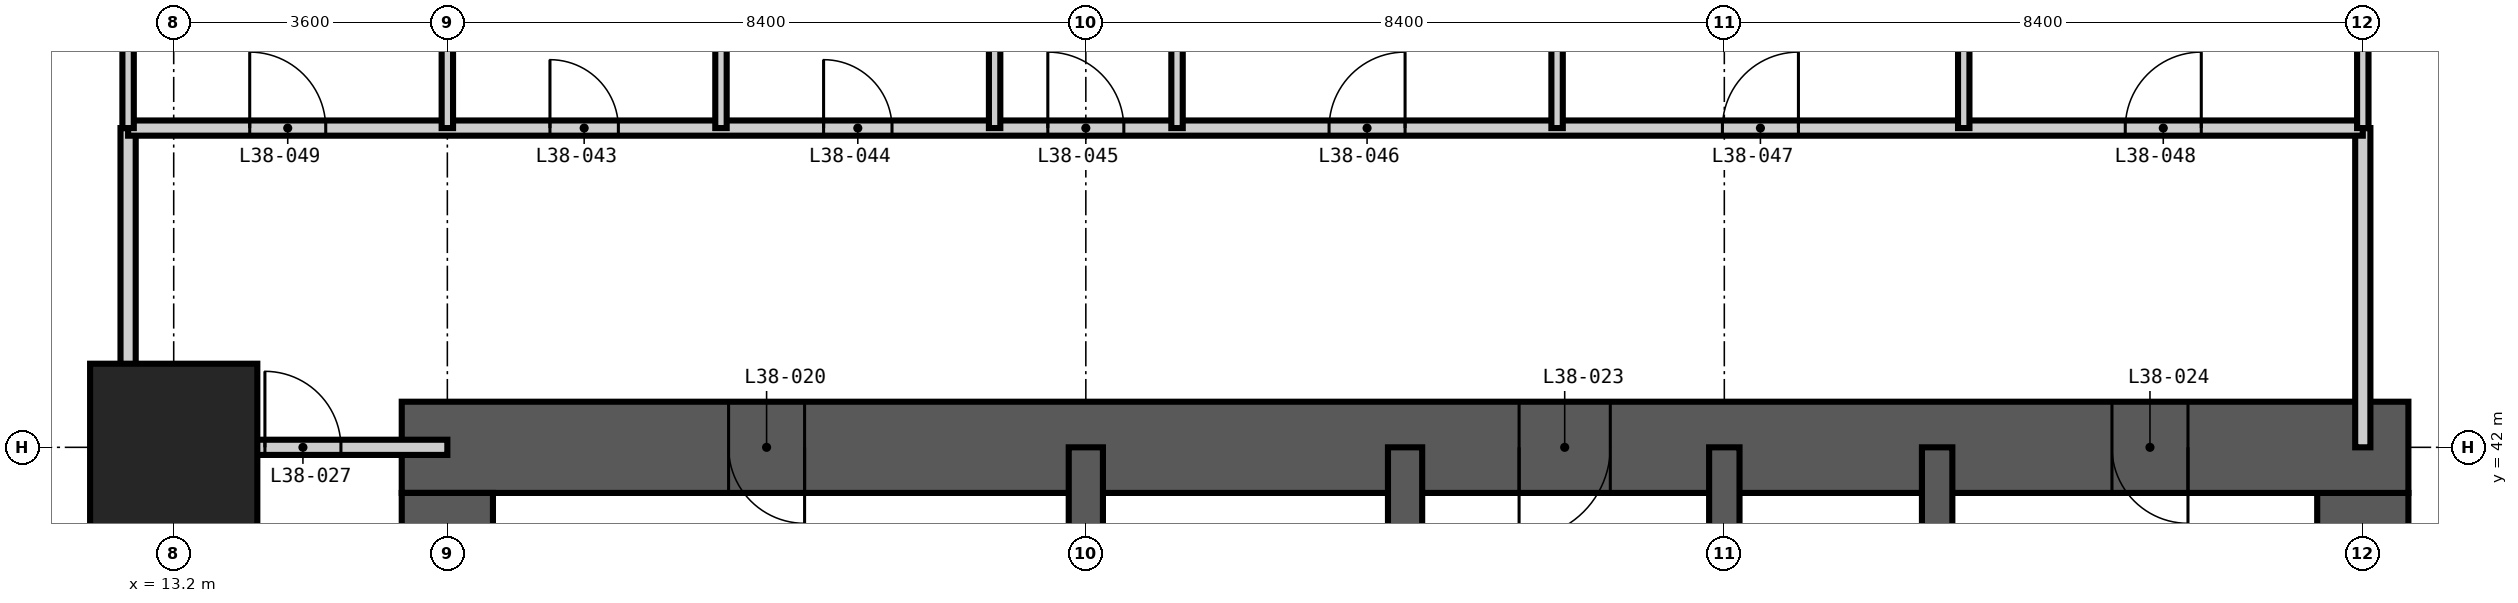
"""IFC4 building model, lengths in metres.
Left out: names, types, materials, properties, quantities, classifications, styles, units other than length and angle.
Written with IfcOpenShell. Run it as: python <this file> out.ifc"""

import sys

from ifc_helpers import new_model, si_unit, direction, frame, frame_2d, origin, origin_2d, place, context, subcontext, project, spatial, rectangle, extrude, element, fill, save


model = new_model("IFC4")
c1 = context("Model", 3, precision=1e-05, world=origin(), true_north=direction((0.0, 1.0)))
c2 = subcontext(c1, "Body", "Model", "MODEL_VIEW")
j1 = project(units=[si_unit("LENGTHUNIT", "METRE"), si_unit("PLANEANGLEUNIT", "RADIAN")], contexts=[c1])
p1 = place(None, origin())
s1 = spatial("IfcSite", under=j1, at=p1, CompositionType="ELEMENT")
p2 = place(p1, origin())
s2 = spatial("IfcBuilding", under=s1, at=p2, CompositionType="ELEMENT")
p3 = place(p2, frame((0.0, 0.0, 147.6)))
s3 = spatial("IfcBuildingStorey", under=s2, at=p3, CompositionType="ELEMENT", Elevation=147.6)
p4 = place(p3, frame((13.2, 42.0, -0.35), z_axis=(0.0, 0.0, 1.0), x_axis=(1.0, 0.0, 0.0)))
e1 = element("IfcColumn", 1, at=p4, inside=s3, PredefinedType="COLUMN", context=c2, shape_type="SweptSolid", body=[
    extrude(rectangle(XDim=2.2, YDim=2.2, at=origin_2d()), origin(), (0.0, 0.0, 1.0), 5.95),
])
p5 = place(p3, frame((42.0, 17.4, -0.35), z_axis=(0.0, 0.0, 1.0), x_axis=(0.0, 1.0, 0.0)))
e2 = element("IfcWall", 2, at=p5, inside=s3, PredefinedType="SHEAR", context=c2, shape_type="SweptSolid", body=[
    extrude(rectangle(XDim=24.0, YDim=1.2, at=frame_2d((12.0, 0.0))), origin(), (0.0, 0.0, 1.0), 5.95),
])
p6 = place(p5, frame((0.2, 0.0, 0.35)))
e3 = element("IfcOpeningElement", 3, at=p6, cuts=e2, PredefinedType="OPENING", context=c2, shape_type="SweptSolid", body=[
    extrude(rectangle(XDim=1.2, YDim=2.2, at=frame_2d((0.6, 1.1))), frame((0.0, 0.61, 0.0), z_axis=(0.0, -1.0, 0.0), x_axis=(1.0, 0.0, 0.0)), (0.0, 0.0, 1.0), 1.22),
])
p7 = place(p5, frame((11.1, 0.0, 0.35)))
e4 = element("IfcOpeningElement", 4, at=p7, cuts=e2, PredefinedType="OPENING", context=c2, shape_type="SweptSolid", body=[
    extrude(rectangle(XDim=1.8, YDim=2.2, at=frame_2d((0.9, 1.1))), frame((0.0, 0.61, 0.0), z_axis=(0.0, -1.0, 0.0), x_axis=(1.0, 0.0, 0.0)), (0.0, 0.0, 1.0), 1.22),
])
p8 = place(p3, frame((42.6, 42.0, -0.35), z_axis=(0.0, 0.0, 1.0), x_axis=(-1.0, 0.0, 0.0)))
e5 = element("IfcWall", 5, at=p8, inside=s3, PredefinedType="SHEAR", context=c2, shape_type="SweptSolid", body=[
    extrude(rectangle(XDim=26.4, YDim=1.2, at=frame_2d((13.2, 0.0))), origin(), (0.0, 0.0, 1.0), 5.95),
])
p9 = place(p8, frame((21.1, 0.0, 0.35)))
e6 = element("IfcOpeningElement", 6, at=p9, cuts=e5, PredefinedType="OPENING", context=c2, shape_type="SweptSolid", body=[
    extrude(rectangle(XDim=1.0, YDim=2.1, at=frame_2d((0.5, 1.05))), frame((0.0, 0.61, 0.0), z_axis=(0.0, -1.0, 0.0), x_axis=(1.0, 0.0, 0.0)), (0.0, 0.0, 1.0), 1.22),
])
p10 = place(p8, frame((10.5, 0.0, 0.35)))
e7 = element("IfcOpeningElement", 7, at=p10, cuts=e5, PredefinedType="OPENING", context=c2, shape_type="SweptSolid", body=[
    extrude(rectangle(XDim=1.2, YDim=2.2, at=frame_2d((0.6, 1.1))), frame((0.0, 0.61, 0.0), z_axis=(0.0, -1.0, 0.0), x_axis=(1.0, 0.0, 0.0)), (0.0, 0.0, 1.0), 1.22),
])
p11 = place(p8, frame((2.9, 0.0, 0.35)))
e8 = element("IfcOpeningElement", 8, at=p11, cuts=e5, PredefinedType="OPENING", context=c2, shape_type="SweptSolid", body=[
    extrude(rectangle(XDim=1.0, YDim=2.1, at=frame_2d((0.5, 1.05))), frame((0.0, 0.61, 0.0), z_axis=(0.0, -1.0, 0.0), x_axis=(1.0, 0.0, 0.0)), (0.0, 0.0, 1.0), 1.22),
])
p12 = place(p3, frame((16.8, 41.4, -0.35), z_axis=(0.0, 0.0, 1.0), x_axis=(0.0, -1.0, 0.0)))
e9 = element("IfcWall", 9, at=p12, inside=s3, PredefinedType="SHEAR", context=c2, shape_type="SweptSolid", body=[
    extrude(rectangle(XDim=24.0, YDim=1.2, at=frame_2d((12.0, 0.0))), origin(), (0.0, 0.0, 1.0), 5.95),
])
p13 = place(p12, frame((11.1, 0.0, 0.35)))
e10 = element("IfcOpeningElement", 10, at=p13, cuts=e9, PredefinedType="OPENING", context=c2, shape_type="SweptSolid", body=[
    extrude(rectangle(XDim=1.8, YDim=2.2, at=frame_2d((0.9, 1.1))), frame((0.0, 0.61, 0.0), z_axis=(0.0, -1.0, 0.0), x_axis=(1.0, 0.0, 0.0)), (0.0, 0.0, 1.0), 1.22),
])
p14 = place(p12, frame((19.5, 0.0, 0.35)))
e11 = element("IfcOpeningElement", 11, at=p14, cuts=e9, PredefinedType="OPENING", context=c2, shape_type="SweptSolid", body=[
    extrude(rectangle(XDim=1.8, YDim=2.2, at=frame_2d((0.9, 1.1))), frame((0.0, 0.61, 0.0), z_axis=(0.0, -1.0, 0.0), x_axis=(1.0, 0.0, 0.0)), (0.0, 0.0, 1.0), 1.22),
])
p15 = place(p12, frame((5.2, 0.0, 0.35)))
e12 = element("IfcOpeningElement", 12, at=p15, cuts=e9, PredefinedType="OPENING", context=c2, shape_type="SweptSolid", body=[
    extrude(rectangle(XDim=1.0, YDim=2.1, at=frame_2d((0.5, 1.05))), frame((0.0, 0.61, 0.0), z_axis=(0.0, -1.0, 0.0), x_axis=(1.0, 0.0, 0.0)), (0.0, 0.0, 1.0), 1.22),
])
p16 = place(p3, frame((33.6, 16.8, -0.35), z_axis=(0.0, 0.0, 1.0), x_axis=(0.0, 1.0, 0.0)))
e13 = element("IfcWall", 13, at=p16, inside=s3, PredefinedType="SHEAR", context=c2, shape_type="SweptSolid", body=[
    extrude(rectangle(XDim=25.2, YDim=0.4, at=frame_2d((12.6, 0.0))), origin(), (0.0, 0.0, 1.0), 5.95),
])
p17 = place(p16, frame((22.5, 0.0, 0.35)))
e14 = element("IfcOpeningElement", 14, at=p17, cuts=e13, PredefinedType="OPENING", context=c2, shape_type="SweptSolid", body=[
    extrude(rectangle(XDim=1.2, YDim=2.2, at=frame_2d((0.6, 1.1))), frame((0.0, 0.21, 0.0), z_axis=(0.0, -1.0, 0.0), x_axis=(1.0, 0.0, 0.0)), (0.0, 0.0, 1.0), 0.42),
])
p18 = place(p16, frame((18.3, 0.0, 0.35)))
e15 = element("IfcOpeningElement", 15, at=p18, cuts=e13, PredefinedType="OPENING", context=c2, shape_type="SweptSolid", body=[
    extrude(rectangle(XDim=1.2, YDim=2.2, at=frame_2d((0.6, 1.1))), frame((0.0, 0.21, 0.0), z_axis=(0.0, -1.0, 0.0), x_axis=(1.0, 0.0, 0.0)), (0.0, 0.0, 1.0), 0.42),
])
p19 = place(p3, frame((36.4, 33.6, -0.35), z_axis=(0.0, 0.0, 1.0), x_axis=(0.0, 1.0, 0.0)))
e16 = element("IfcWall", 16, at=p19, inside=s3, PredefinedType="SHEAR", context=c2, shape_type="SweptSolid", body=[
    extrude(rectangle(XDim=8.4, YDim=0.4, at=frame_2d((4.2, 0.0))), origin(), (0.0, 0.0, 1.0), 5.95),
])
p20 = place(p3, frame((25.2, 16.8, -0.35), z_axis=(0.0, 0.0, 1.0), x_axis=(0.0, 1.0, 0.0)))
e17 = element("IfcWall", 17, at=p20, inside=s3, PredefinedType="SHEAR", context=c2, shape_type="SweptSolid", body=[
    extrude(rectangle(XDim=25.2, YDim=0.45, at=frame_2d((12.6, 0.0))), origin(), (0.0, 0.0, 1.0), 5.95),
])
p21 = place(p3, frame((29.4, 33.6, -0.35), z_axis=(0.0, 0.0, 1.0), x_axis=(0.0, 1.0, 0.0)))
e18 = element("IfcWall", 18, at=p21, inside=s3, PredefinedType="SHEAR", context=c2, shape_type="SweptSolid", body=[
    extrude(rectangle(XDim=8.4, YDim=0.45, at=frame_2d((4.2, 0.0))), origin(), (0.0, 0.0, 1.0), 5.95),
])
p22 = place(p21, frame((0.525, 0.0, 0.35)))
e19 = element("IfcOpeningElement", 19, at=p22, cuts=e18, PredefinedType="OPENING", context=c2, shape_type="SweptSolid", body=[
    extrude(rectangle(XDim=1.2, YDim=2.2, at=frame_2d((0.6, 1.1))), frame((0.0, 0.235, 0.0), z_axis=(0.0, -1.0, 0.0), x_axis=(1.0, 0.0, 0.0)), (0.0, 0.0, 1.0), 0.47),
])
p23 = place(p3, frame((12.6, 33.6, 0.0), z_axis=(0.0, 0.0, 1.0), x_axis=(0.0, 1.0, 0.0)))
e20 = element("IfcWall", 20, at=p23, inside=s3, PredefinedType="PARTITIONING", context=c2, shape_type="SweptSolid", body=[
    extrude(rectangle(XDim=12.6, YDim=0.2, at=frame_2d((6.3, 0.0))), origin(), (0.0, 0.0, 1.0), 5.6),
])
p24 = place(p3, frame((42.0, 42.0, 0.0), z_axis=(0.0, 0.0, 1.0), x_axis=(0.0, 1.0, 0.0)))
e21 = element("IfcWall", 21, at=p24, inside=s3, PredefinedType="PARTITIONING", context=c2, shape_type="SweptSolid", body=[
    extrude(rectangle(XDim=4.2, YDim=0.2, at=frame_2d((2.1, 0.0))), origin(), (0.0, 0.0, 1.0), 5.6),
])
p25 = place(p3, frame((12.6, 42.0, 0.0), z_axis=(0.0, 0.0, 1.0), x_axis=(1.0, 0.0, 0.0)))
e22 = element("IfcWall", 22, at=p25, inside=s3, PredefinedType="PARTITIONING", context=c2, shape_type="SweptSolid", body=[
    extrude(rectangle(XDim=4.2, YDim=0.2, at=frame_2d((2.1, 0.0))), origin(), (0.0, 0.0, 1.0), 5.6),
])
p26 = place(p25, frame((1.8, 0.0, 0.0)))
e23 = element("IfcOpeningElement", 23, at=p26, cuts=e22, PredefinedType="OPENING", context=c2, shape_type="SweptSolid", body=[
    extrude(rectangle(XDim=1.0, YDim=2.1, at=frame_2d((0.5, 1.05))), frame((0.0, 0.11, 0.0), z_axis=(0.0, -1.0, 0.0), x_axis=(1.0, 0.0, 0.0)), (0.0, 0.0, 1.0), 0.22),
])
p27 = place(p3, frame((12.6, 46.2, 0.0), z_axis=(0.0, 0.0, 1.0), x_axis=(1.0, 0.0, 0.0)))
e24 = element("IfcWall", 24, at=p27, inside=s3, PredefinedType="PARTITIONING", context=c2, shape_type="SweptSolid", body=[
    extrude(rectangle(XDim=29.4, YDim=0.2, at=frame_2d((14.7, 0.0))), origin(), (0.0, 0.0, 1.0), 5.6),
])
p28 = place(p27, frame((5.55, 0.0, 0.0)))
e25 = element("IfcOpeningElement", 25, at=p28, cuts=e24, PredefinedType="OPENING", context=c2, shape_type="SweptSolid", body=[
    extrude(rectangle(XDim=0.9, YDim=2.1, at=frame_2d((0.45, 1.05))), frame((0.0, 0.11, 0.0), z_axis=(0.0, -1.0, 0.0), x_axis=(1.0, 0.0, 0.0)), (0.0, 0.0, 1.0), 0.22),
])
p29 = place(p27, frame((9.15, 0.0, 0.0)))
e26 = element("IfcOpeningElement", 26, at=p29, cuts=e24, PredefinedType="OPENING", context=c2, shape_type="SweptSolid", body=[
    extrude(rectangle(XDim=0.9, YDim=2.1, at=frame_2d((0.45, 1.05))), frame((0.0, 0.11, 0.0), z_axis=(0.0, -1.0, 0.0), x_axis=(1.0, 0.0, 0.0)), (0.0, 0.0, 1.0), 0.22),
])
p30 = place(p27, frame((12.1, 0.0, 0.0)))
e27 = element("IfcOpeningElement", 27, at=p30, cuts=e24, PredefinedType="OPENING", context=c2, shape_type="SweptSolid", body=[
    extrude(rectangle(XDim=1.0, YDim=2.1, at=frame_2d((0.5, 1.05))), frame((0.0, 0.11, 0.0), z_axis=(0.0, -1.0, 0.0), x_axis=(1.0, 0.0, 0.0)), (0.0, 0.0, 1.0), 0.22),
])
p31 = place(p27, frame((15.8, 0.0, 0.0)))
e28 = element("IfcOpeningElement", 28, at=p31, cuts=e24, PredefinedType="OPENING", context=c2, shape_type="SweptSolid", body=[
    extrude(rectangle(XDim=1.0, YDim=2.1, at=frame_2d((0.5, 1.05))), frame((0.0, 0.11, 0.0), z_axis=(0.0, -1.0, 0.0), x_axis=(1.0, 0.0, 0.0)), (0.0, 0.0, 1.0), 0.22),
])
p32 = place(p27, frame((20.975, 0.0, 0.0)))
e29 = element("IfcOpeningElement", 29, at=p32, cuts=e24, PredefinedType="OPENING", context=c2, shape_type="SweptSolid", body=[
    extrude(rectangle(XDim=1.0, YDim=2.1, at=frame_2d((0.5, 1.05))), frame((0.0, 0.11, 0.0), z_axis=(0.0, -1.0, 0.0), x_axis=(1.0, 0.0, 0.0)), (0.0, 0.0, 1.0), 0.22),
])
p33 = place(p27, frame((26.275, 0.0, 0.0)))
e30 = element("IfcOpeningElement", 30, at=p33, cuts=e24, PredefinedType="OPENING", context=c2, shape_type="SweptSolid", body=[
    extrude(rectangle(XDim=1.0, YDim=2.1, at=frame_2d((0.5, 1.05))), frame((0.0, 0.11, 0.0), z_axis=(0.0, -1.0, 0.0), x_axis=(1.0, 0.0, 0.0)), (0.0, 0.0, 1.0), 0.22),
])
p34 = place(p27, frame((1.6, 0.0, 0.0)))
e31 = element("IfcOpeningElement", 31, at=p34, cuts=e24, PredefinedType="OPENING", context=c2, shape_type="SweptSolid", body=[
    extrude(rectangle(XDim=1.0, YDim=2.1, at=frame_2d((0.5, 1.05))), frame((0.0, 0.11, 0.0), z_axis=(0.0, -1.0, 0.0), x_axis=(1.0, 0.0, 0.0)), (0.0, 0.0, 1.0), 0.22),
])
p35 = place(p3, frame((12.6, 46.2, 0.0), z_axis=(0.0, 0.0, 1.0), x_axis=(0.0, 1.0, 0.0)))
e32 = element("IfcWall", 32, at=p35, inside=s3, PredefinedType="PARTITIONING", context=c2, shape_type="SweptSolid", body=[
    extrude(rectangle(XDim=8.438, YDim=0.15, at=frame_2d((4.219, 0.0))), origin(), (0.0, 0.0, 1.0), 5.6),
])
for number, where, z_axis, x_axis in (
    (33, (16.8, 46.2, 0.0), (0.0, 0.0, 1.0), (0.0, 1.0, 0.0)),
    (34, (20.4, 46.2, 0.0), (0.0, 0.0, 1.0), (0.0, 1.0, 0.0)),
    (35, (24.0, 46.2, 0.0), (0.0, 0.0, 1.0), (0.0, 1.0, 0.0)),
):
    element("IfcWall", number, at=place(p3, frame(where, z_axis=z_axis, x_axis=x_axis)), inside=s3, PredefinedType="PARTITIONING", context=c2, shape_type="SweptSolid", body=[
        extrude(rectangle(XDim=4.2, YDim=0.15, at=frame_2d((2.1, 0.0))), origin(), (0.0, 0.0, 1.0), 5.6),
    ])
p36 = place(p3, frame((26.4, 46.2, 0.0), z_axis=(0.0, 0.0, 1.0), x_axis=(0.0, 1.0, 0.0)))
e36 = element("IfcWall", 36, at=p36, inside=s3, PredefinedType="PARTITIONING", context=c2, shape_type="SweptSolid", body=[
    extrude(rectangle(XDim=8.438, YDim=0.15, at=frame_2d((4.219, 0.0))), origin(), (0.0, 0.0, 1.0), 5.6),
])
p37 = place(p3, frame((31.4, 46.2, 0.0), z_axis=(0.0, 0.0, 1.0), x_axis=(0.0, 1.0, 0.0)))
e37 = element("IfcWall", 37, at=p37, inside=s3, PredefinedType="PARTITIONING", context=c2, shape_type="SweptSolid", body=[
    extrude(rectangle(XDim=8.4, YDim=0.15, at=frame_2d((4.2, 0.0))), origin(), (0.0, 0.0, 1.0), 5.6),
])
for number, where, z_axis, x_axis in (
    (38, (36.75, 46.2, 0.0), (0.0, 0.0, 1.0), (0.0, 1.0, 0.0)),
    (39, (42.0, 46.2, 0.0), (0.0, 0.0, 1.0), (0.0, 1.0, 0.0)),
):
    element("IfcWall", number, at=place(p3, frame(where, z_axis=z_axis, x_axis=x_axis)), inside=s3, PredefinedType="PARTITIONING", context=c2, shape_type="SweptSolid", body=[
        extrude(rectangle(XDim=8.438, YDim=0.15, at=frame_2d((4.219, 0.0))), origin(), (0.0, 0.0, 1.0), 5.6),
    ])
p38 = place(p9, origin())
e40 = element("IfcDoor", 40, at=p38, inside=s3, OperationType="SINGLE_SWING_LEFT", PredefinedType="DOOR", context=c2, shape_type="SweptSolid", body=[
    extrude(rectangle(XDim=1.0, YDim=2.1, at=frame_2d((0.5, 1.05))), frame((0.0, 0.025, 0.0), z_axis=(0.0, -1.0, 0.0), x_axis=(1.0, 0.0, 0.0)), (0.0, 0.0, 1.0), 0.05),
])
fill(e6, e40)
p39 = place(p10, origin())
e41 = element("IfcDoor", 41, at=p39, inside=s3, OperationType="SINGLE_SWING_RIGHT", PredefinedType="DOOR", context=c2, shape_type="SweptSolid", body=[
    extrude(rectangle(XDim=1.2, YDim=2.2, at=frame_2d((0.6, 1.1))), frame((0.0, 0.025, 0.0), z_axis=(0.0, -1.0, 0.0), x_axis=(1.0, 0.0, 0.0)), (0.0, 0.0, 1.0), 0.05),
])
fill(e7, e41)
p40 = place(p11, origin())
e42 = element("IfcDoor", 42, at=p40, inside=s3, OperationType="SINGLE_SWING_LEFT", PredefinedType="DOOR", context=c2, shape_type="SweptSolid", body=[
    extrude(rectangle(XDim=1.0, YDim=2.1, at=frame_2d((0.5, 1.05))), frame((0.0, 0.025, 0.0), z_axis=(0.0, -1.0, 0.0), x_axis=(1.0, 0.0, 0.0)), (0.0, 0.0, 1.0), 0.05),
])
fill(e8, e42)
p41 = place(p26, origin())
e43 = element("IfcDoor", 43, at=p41, inside=s3, OperationType="SINGLE_SWING_LEFT", PredefinedType="DOOR", context=c2, shape_type="SweptSolid", body=[
    extrude(rectangle(XDim=1.0, YDim=2.1, at=frame_2d((0.5, 1.05))), frame((0.0, 0.025, 0.0), z_axis=(0.0, -1.0, 0.0), x_axis=(1.0, 0.0, 0.0)), (0.0, 0.0, 1.0), 0.05),
])
fill(e23, e43)
p42 = place(p28, origin())
e44 = element("IfcDoor", 44, at=p42, inside=s3, OperationType="SINGLE_SWING_LEFT", PredefinedType="DOOR", context=c2, shape_type="SweptSolid", body=[
    extrude(rectangle(XDim=0.9, YDim=2.1, at=frame_2d((0.45, 1.05))), frame((0.0, 0.025, 0.0), z_axis=(0.0, -1.0, 0.0), x_axis=(1.0, 0.0, 0.0)), (0.0, 0.0, 1.0), 0.05),
])
fill(e25, e44)
p43 = place(p29, origin())
e45 = element("IfcDoor", 45, at=p43, inside=s3, OperationType="SINGLE_SWING_LEFT", PredefinedType="DOOR", context=c2, shape_type="SweptSolid", body=[
    extrude(rectangle(XDim=0.9, YDim=2.1, at=frame_2d((0.45, 1.05))), frame((0.0, 0.025, 0.0), z_axis=(0.0, -1.0, 0.0), x_axis=(1.0, 0.0, 0.0)), (0.0, 0.0, 1.0), 0.05),
])
fill(e26, e45)
p44 = place(p30, origin())
e46 = element("IfcDoor", 46, at=p44, inside=s3, OperationType="SINGLE_SWING_LEFT", PredefinedType="DOOR", context=c2, shape_type="SweptSolid", body=[
    extrude(rectangle(XDim=1.0, YDim=2.1, at=frame_2d((0.5, 1.05))), frame((0.0, 0.025, 0.0), z_axis=(0.0, -1.0, 0.0), x_axis=(1.0, 0.0, 0.0)), (0.0, 0.0, 1.0), 0.05),
])
fill(e27, e46)
p45 = place(p31, origin())
e47 = element("IfcDoor", 47, at=p45, inside=s3, OperationType="SINGLE_SWING_RIGHT", PredefinedType="DOOR", context=c2, shape_type="SweptSolid", body=[
    extrude(rectangle(XDim=1.0, YDim=2.1, at=frame_2d((0.5, 1.05))), frame((0.0, 0.025, 0.0), z_axis=(0.0, -1.0, 0.0), x_axis=(1.0, 0.0, 0.0)), (0.0, 0.0, 1.0), 0.05),
])
fill(e28, e47)
p46 = place(p32, origin())
e48 = element("IfcDoor", 48, at=p46, inside=s3, OperationType="SINGLE_SWING_RIGHT", PredefinedType="DOOR", context=c2, shape_type="SweptSolid", body=[
    extrude(rectangle(XDim=1.0, YDim=2.1, at=frame_2d((0.5, 1.05))), frame((0.0, 0.025, 0.0), z_axis=(0.0, -1.0, 0.0), x_axis=(1.0, 0.0, 0.0)), (0.0, 0.0, 1.0), 0.05),
])
fill(e29, e48)
p47 = place(p33, origin())
e49 = element("IfcDoor", 49, at=p47, inside=s3, OperationType="SINGLE_SWING_RIGHT", PredefinedType="DOOR", context=c2, shape_type="SweptSolid", body=[
    extrude(rectangle(XDim=1.0, YDim=2.1, at=frame_2d((0.5, 1.05))), frame((0.0, 0.025, 0.0), z_axis=(0.0, -1.0, 0.0), x_axis=(1.0, 0.0, 0.0)), (0.0, 0.0, 1.0), 0.05),
])
fill(e30, e49)
p48 = place(p34, origin())
e50 = element("IfcDoor", 50, at=p48, inside=s3, OperationType="SINGLE_SWING_LEFT", PredefinedType="DOOR", context=c2, shape_type="SweptSolid", body=[
    extrude(rectangle(XDim=1.0, YDim=2.1, at=frame_2d((0.5, 1.05))), frame((0.0, 0.025, 0.0), z_axis=(0.0, -1.0, 0.0), x_axis=(1.0, 0.0, 0.0)), (0.0, 0.0, 1.0), 0.05),
])
fill(e31, e50)
save(model, sys.argv[1])
